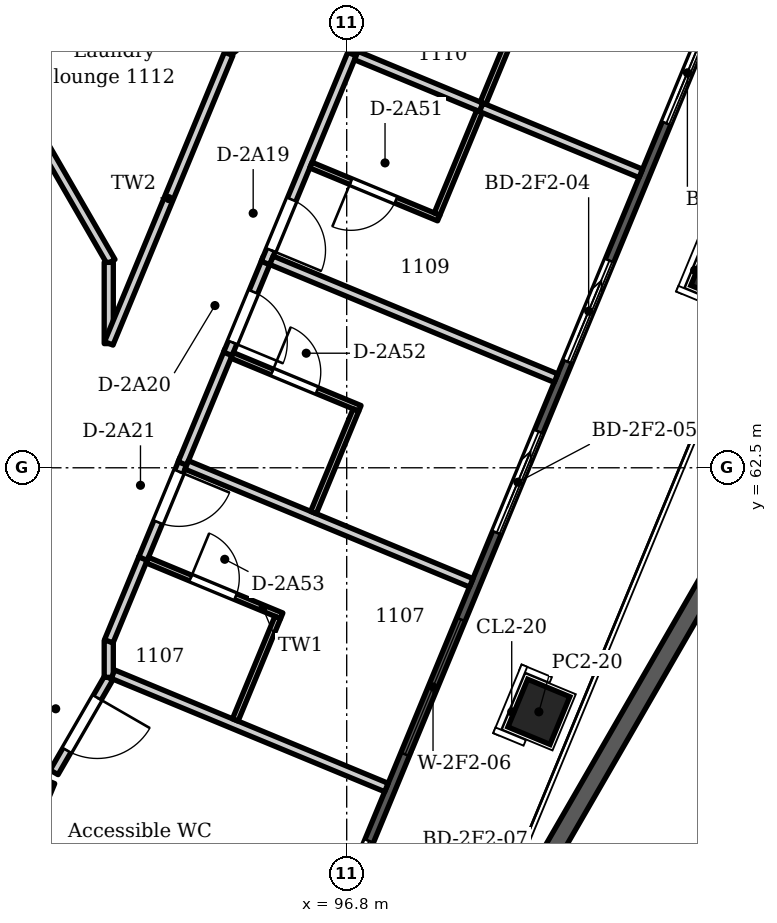
"""IFC4 building model, lengths in metres.
Left out: names, types, materials, properties, quantities, classifications, styles, units other than length and angle.
Written with IfcOpenShell. Run it as: python <this file> out.ifc"""

import sys

from ifc_helpers import new_model, si_unit, direction, frame, frame_2d, origin, origin_2d, place, context, subcontext, project, spatial, polyline, rectangle, outline, extrude, element, fill, save


model = new_model("IFC4")
c1 = context("Model", 3, precision=1e-05, world=origin(), true_north=direction((0.0, 1.0)))
c2 = subcontext(c1, "Body", "Model", "MODEL_VIEW")
j1 = project(units=[si_unit("LENGTHUNIT", "METRE"), si_unit("PLANEANGLEUNIT", "RADIAN")], contexts=[c1])
p1 = place(None, origin())
s1 = spatial("IfcSite", under=j1, at=p1, CompositionType="ELEMENT")
p2 = place(p1, origin())
s2 = spatial("IfcBuilding", under=s1, at=p2, CompositionType="ELEMENT")
p3 = place(p2, frame((0.0, 0.0, 50.4)))
s3 = spatial("IfcBuildingStorey", under=s2, at=p3, CompositionType="ELEMENT", Elevation=50.4)
for number, where, z_axis, x_axis in (
    (1, (102.968, 65.749, -0.35), (0.0, 0.0, 1.0), (0.383, 0.924, 0.0)),
    (2, (99.96, 58.486, -0.35), (0.0, 0.0, 1.0), (0.383, 0.924, 0.0)),
):
    element("IfcColumn", number, at=place(p3, frame(where, z_axis=z_axis, x_axis=x_axis)), inside=s3, PredefinedType="COLUMN", context=c2, shape_type="SweptSolid", body=[
        extrude(rectangle(XDim=0.85, YDim=0.75, at=origin_2d()), origin(), (0.0, 0.0, 1.0), 3.95),
    ])
p4 = place(p3, frame((105.889, 77.411, 0.0), z_axis=(0.0, 0.0, 1.0), x_axis=(-0.38268395344, -0.923879316675, 0.0)))
e3 = element("IfcWall", 3, at=p4, inside=s3, PredefinedType="SOLIDWALL", context=c2, shape_type="SweptSolid", body=[
    extrude(outline(polyline([(0.149, 0.075), (0.149, -0.075), (47.217, -0.075), (47.217, 0.075), (0.149, 0.075)])), origin(), (0.0, 0.0, 1.0), 3.3),
])
p5 = place(p4, frame((1.222, 0.0, 0.0)))
e4 = element("IfcOpeningElement", 4, at=p5, cuts=e3, PredefinedType="OPENING", context=c2, shape_type="SweptSolid", body=[
    extrude(rectangle(XDim=1.8, YDim=2.6, at=frame_2d((0.9, 1.3))), frame((0.0, 0.085, 0.0), z_axis=(0.0, -1.0, 0.0), x_axis=(1.0, 0.0, 0.0)), (0.0, 0.0, 1.0), 0.17),
])
p6 = place(p4, frame((4.565, 0.0, 0.0)))
e5 = element("IfcOpeningElement", 5, at=p6, cuts=e3, PredefinedType="OPENING", context=c2, shape_type="SweptSolid", body=[
    extrude(rectangle(XDim=1.8, YDim=2.6, at=frame_2d((0.9, 1.3))), frame((0.0, 0.085, 0.0), z_axis=(0.0, -1.0, 0.0), x_axis=(1.0, 0.0, 0.0)), (0.0, 0.0, 1.0), 0.17),
])
p7 = place(p4, frame((8.209, 0.0, 0.0)))
e6 = element("IfcOpeningElement", 6, at=p7, cuts=e3, PredefinedType="OPENING", context=c2, shape_type="SweptSolid", body=[
    extrude(rectangle(XDim=1.8, YDim=2.6, at=frame_2d((0.9, 1.3))), frame((0.0, 0.085, 0.0), z_axis=(0.0, -1.0, 0.0), x_axis=(1.0, 0.0, 0.0)), (0.0, 0.0, 1.0), 0.17),
])
p8 = place(p4, frame((12.453, 0.0, 0.0)))
e7 = element("IfcOpeningElement", 7, at=p8, cuts=e3, PredefinedType="OPENING", context=c2, shape_type="SweptSolid", body=[
    extrude(rectangle(XDim=1.8, YDim=2.6, at=frame_2d((0.9, 1.3))), frame((0.0, 0.085, 0.0), z_axis=(0.0, -1.0, 0.0), x_axis=(1.0, 0.0, 0.0)), (0.0, 0.0, 1.0), 0.17),
])
p9 = place(p4, frame((15.496, 0.0, 0.0)))
e8 = element("IfcOpeningElement", 8, at=p9, cuts=e3, PredefinedType="OPENING", context=c2, shape_type="SweptSolid", body=[
    extrude(rectangle(XDim=1.8, YDim=2.6, at=frame_2d((0.9, 1.3))), frame((0.0, 0.085, 0.0), z_axis=(0.0, -1.0, 0.0), x_axis=(1.0, 0.0, 0.0)), (0.0, 0.0, 1.0), 0.17),
])
p10 = place(p4, frame((18.84, 0.0, 0.15)))
e9 = element("IfcOpeningElement", 9, at=p10, cuts=e3, PredefinedType="OPENING", context=c2, shape_type="SweptSolid", body=[
    extrude(rectangle(XDim=2.4, YDim=2.45, at=frame_2d((1.2, 1.225))), frame((0.0, 0.085, 0.0), z_axis=(0.0, -1.0, 0.0), x_axis=(1.0, 0.0, 0.0)), (0.0, 0.0, 1.0), 0.17),
])
p11 = place(p4, frame((22.783, 0.0, 0.0)))
e10 = element("IfcOpeningElement", 10, at=p11, cuts=e3, PredefinedType="OPENING", context=c2, shape_type="SweptSolid", body=[
    extrude(rectangle(XDim=1.8, YDim=2.6, at=frame_2d((0.9, 1.3))), frame((0.0, 0.085, 0.0), z_axis=(0.0, -1.0, 0.0), x_axis=(1.0, 0.0, 0.0)), (0.0, 0.0, 1.0), 0.17),
])
p12 = place(p4, frame((26.127, 0.0, 0.15)))
e11 = element("IfcOpeningElement", 11, at=p12, cuts=e3, PredefinedType="OPENING", context=c2, shape_type="SweptSolid", body=[
    extrude(rectangle(XDim=2.4, YDim=2.45, at=frame_2d((1.2, 1.225))), frame((0.0, 0.085, 0.0), z_axis=(0.0, -1.0, 0.0), x_axis=(1.0, 0.0, 0.0)), (0.0, 0.0, 1.0), 0.17),
])
p13 = place(p4, frame((30.071, 0.0, 0.0)))
e12 = element("IfcOpeningElement", 12, at=p13, cuts=e3, PredefinedType="OPENING", context=c2, shape_type="SweptSolid", body=[
    extrude(rectangle(XDim=1.8, YDim=2.6, at=frame_2d((0.9, 1.3))), frame((0.0, 0.085, 0.0), z_axis=(0.0, -1.0, 0.0), x_axis=(1.0, 0.0, 0.0)), (0.0, 0.0, 1.0), 0.17),
])
p14 = place(p4, frame((33.114, 0.0, 0.0)))
e13 = element("IfcOpeningElement", 13, at=p14, cuts=e3, PredefinedType="OPENING", context=c2, shape_type="SweptSolid", body=[
    extrude(rectangle(XDim=1.8, YDim=2.6, at=frame_2d((0.9, 1.3))), frame((0.0, 0.085, 0.0), z_axis=(0.0, -1.0, 0.0), x_axis=(1.0, 0.0, 0.0)), (0.0, 0.0, 1.0), 0.17),
])
p15 = place(p4, frame((37.358, 0.0, 0.0)))
e14 = element("IfcOpeningElement", 14, at=p15, cuts=e3, PredefinedType="OPENING", context=c2, shape_type="SweptSolid", body=[
    extrude(rectangle(XDim=1.8, YDim=2.6, at=frame_2d((0.9, 1.3))), frame((0.0, 0.085, 0.0), z_axis=(0.0, -1.0, 0.0), x_axis=(1.0, 0.0, 0.0)), (0.0, 0.0, 1.0), 0.17),
])
p16 = place(p4, frame((41.001, 0.0, 0.0)))
e15 = element("IfcOpeningElement", 15, at=p16, cuts=e3, PredefinedType="OPENING", context=c2, shape_type="SweptSolid", body=[
    extrude(rectangle(XDim=1.8, YDim=2.6, at=frame_2d((0.9, 1.3))), frame((0.0, 0.085, 0.0), z_axis=(0.0, -1.0, 0.0), x_axis=(1.0, 0.0, 0.0)), (0.0, 0.0, 1.0), 0.17),
])
p17 = place(p4, frame((44.345, 0.0, 0.0)))
e16 = element("IfcOpeningElement", 16, at=p17, cuts=e3, PredefinedType="OPENING", context=c2, shape_type="SweptSolid", body=[
    extrude(rectangle(XDim=1.8, YDim=2.6, at=frame_2d((0.9, 1.3))), frame((0.0, 0.085, 0.0), z_axis=(0.0, -1.0, 0.0), x_axis=(1.0, 0.0, 0.0)), (0.0, 0.0, 1.0), 0.17),
])
p18 = place(p3, origin())
e17 = element("IfcWall", 17, at=p18, inside=s3, PredefinedType="PARAPET", context=c2, shape_type="SweptSolid", body=[
    extrude(outline(polyline([(97.885, 51.908), (112.536, 77.285), (112.189, 77.285), (98.764, 54.032), (97.885, 51.908)])), origin(), (0.0, 0.0, 1.0), 1.1),
])
p19 = place(p3, frame((87.811, 47.393, 0.0), z_axis=(0.0, 0.0, 1.0), x_axis=(0.382671722525, 0.923884382799, 0.0)))
e18 = element("IfcWall", 18, at=p19, inside=s3, PredefinedType="PARTITIONING", context=c2, shape_type="SweptSolid", body=[
    extrude(rectangle(XDim=10.761, YDim=0.15, at=frame_2d((5.38, 0.0))), origin(), (0.0, 0.0, 1.0), 3.3),
])
p20 = place(p19, frame((8.096, 0.0, 0.0)))
e19 = element("IfcOpeningElement", 19, at=p20, cuts=e18, PredefinedType="OPENING", context=c2, shape_type="SweptSolid", body=[
    extrude(rectangle(XDim=0.9, YDim=2.1, at=frame_2d((0.45, 1.05))), frame((0.0, 0.085, 0.0), z_axis=(0.0, -1.0, 0.0), x_axis=(1.0, 0.0, 0.0)), (0.0, 0.0, 1.0), 0.17),
])
p21 = place(p3, frame((89.471, 71.869, 0.0), z_axis=(0.0, 0.0, 1.0), x_axis=(0.50000193825, -0.866024284732, 0.0)))
e20 = element("IfcWall", 20, at=p21, inside=s3, PredefinedType="PARTITIONING", context=c2, shape_type="SweptSolid", body=[
    extrude(rectangle(XDim=6.906, YDim=0.15, at=frame_2d((3.453, 0.0))), origin(), (0.0, 0.0, 1.0), 2.75),
])
p22 = place(p3, frame((90.542, 75.042, 0.0), z_axis=(0.0, 0.0, 1.0), x_axis=(0.608724186816, -0.793381915842, 0.0)))
e21 = element("IfcWall", 21, at=p22, inside=s3, PredefinedType="PARTITIONING", context=c2, shape_type="SweptSolid", body=[
    extrude(rectangle(XDim=7.215, YDim=0.15, at=frame_2d((3.607, 0.0))), origin(), (0.0, 0.0, 1.0), 2.75),
])
p23 = place(p22, frame((3.12, 0.0, 0.0)))
e22 = element("IfcOpeningElement", 22, at=p23, cuts=e21, PredefinedType="OPENING", context=c2, shape_type="SweptSolid", body=[
    extrude(rectangle(XDim=0.9, YDim=2.1, at=frame_2d((0.45, 1.05))), frame((0.0, 0.085, 0.0), z_axis=(0.0, -1.0, 0.0), x_axis=(1.0, 0.0, 0.0)), (0.0, 0.0, 1.0), 0.17),
])
p24 = place(p3, frame((91.988, 57.491, 0.0), z_axis=(0.0, 0.0, 1.0), x_axis=(0.500200642588, 0.865909531738, 0.0)))
e23 = element("IfcWall", 23, at=p24, inside=s3, PredefinedType="PARTITIONING", context=c2, shape_type="SweptSolid", body=[
    extrude(rectangle(XDim=1.797, YDim=0.15, at=frame_2d((0.898, 0.0))), origin(), (0.0, 0.0, 1.0), 3.3),
])
p25 = place(p24, frame((0.419, 0.0, 0.0)))
e24 = element("IfcOpeningElement", 24, at=p25, cuts=e23, PredefinedType="OPENING", context=c2, shape_type="SweptSolid", body=[
    extrude(rectangle(XDim=1.0, YDim=2.1, at=frame_2d((0.5, 1.05))), frame((0.0, 0.085, 0.0), z_axis=(0.0, -1.0, 0.0), x_axis=(1.0, 0.0, 0.0)), (0.0, 0.0, 1.0), 0.17),
])
p26 = place(p3, frame((92.887, 59.054, 0.0), z_axis=(0.0, 0.0, 1.0), x_axis=(0.0, 1.0, 0.0)))
e25 = element("IfcWall", 25, at=p26, inside=s3, PredefinedType="PARTITIONING", context=c2, shape_type="SweptSolid", body=[
    extrude(rectangle(XDim=0.604, YDim=0.15, at=frame_2d((0.302, 0.0))), origin(), (0.0, 0.0, 1.0), 3.3),
])
p27 = place(p3, frame((92.956, 59.105, 0.0), z_axis=(0.0, 0.0, 1.0), x_axis=(0.923843801062, -0.382769684325, 0.0)))
e26 = element("IfcWall", 26, at=p27, inside=s3, PredefinedType="PARTITIONING", context=c2, shape_type="SweptSolid", body=[
    extrude(rectangle(XDim=4.867, YDim=0.15, at=frame_2d((2.434, 0.0))), origin(), (0.0, 0.0, 1.0), 3.3),
])
p28 = place(p3, frame((92.887, 59.646, 0.0), z_axis=(0.0, 0.0, 1.0), x_axis=(0.382283814647, 0.924044958354, 0.0)))
e27 = element("IfcWall", 27, at=p28, inside=s3, PredefinedType="PARTITIONING", context=c2, shape_type="SweptSolid", body=[
    extrude(rectangle(XDim=1.48, YDim=0.15, at=frame_2d((0.74, 0.0))), origin(), (0.0, 0.0, 1.0), 3.3),
])
p29 = place(p3, frame((92.887, 64.542, 0.0), z_axis=(0.0, 0.0, 1.0), x_axis=(0.0, 1.0, 0.0)))
e28 = element("IfcWall", 28, at=p29, inside=s3, PredefinedType="PARTITIONING", context=c2, shape_type="SweptSolid", body=[
    extrude(rectangle(XDim=1.336, YDim=0.15, at=frame_2d((0.668, 0.0))), origin(), (0.0, 0.0, 1.0), 3.3),
])
p30 = place(p3, frame((92.887, 64.546, 0.0), z_axis=(0.0, 0.0, 1.0), x_axis=(0.382690656651, 0.923876540081, 0.0)))
e29 = element("IfcWall", 29, at=p30, inside=s3, PredefinedType="PARTITIONING", context=c2, shape_type="SweptSolid", body=[
    extrude(rectangle(XDim=5.154, YDim=0.15, at=frame_2d((2.577, 0.0))), origin(), (0.0, 0.0, 1.0), 3.3),
])
p31 = place(p3, frame((93.45, 61.006, 0.0), z_axis=(0.0, 0.0, 1.0), x_axis=(0.382917833313, 0.923782405619, 0.0)))
e30 = element("IfcWall", 30, at=p31, inside=s3, PredefinedType="PARTITIONING", context=c2, shape_type="SweptSolid", body=[
    extrude(rectangle(XDim=1.778, YDim=0.15, at=frame_2d((0.889, 0.0))), origin(), (0.0, 0.0, 1.0), 3.3),
])
p32 = place(p31, frame((0.648, 0.0, 0.0)))
e31 = element("IfcOpeningElement", 31, at=p32, cuts=e30, PredefinedType="OPENING", context=c2, shape_type="SweptSolid", body=[
    extrude(rectangle(XDim=0.9, YDim=2.1, at=frame_2d((0.45, 1.05))), frame((0.0, 0.085, 0.0), z_axis=(0.0, -1.0, 0.0), x_axis=(1.0, 0.0, 0.0)), (0.0, 0.0, 1.0), 0.17),
])
p33 = place(p3, frame((93.521, 60.981, 0.0), z_axis=(0.0, 0.0, 1.0), x_axis=(0.9238961731, -0.38264325596, 0.0)))
e32 = element("IfcWall", 32, at=p33, inside=s3, PredefinedType="PARTITIONING", context=c2, shape_type="SweptSolid", body=[
    extrude(rectangle(XDim=2.392, YDim=0.1, at=frame_2d((1.196, 0.0))), origin(), (0.0, 0.0, 1.0), 3.3),
])
p34 = place(p33, frame((0.771, 0.0, 0.0)))
e33 = element("IfcOpeningElement", 33, at=p34, cuts=e32, PredefinedType="OPENING", context=c2, shape_type="SweptSolid", body=[
    extrude(rectangle(XDim=0.8, YDim=2.1, at=frame_2d((0.4, 1.05))), frame((0.0, 0.06, 0.0), z_axis=(0.0, -1.0, 0.0), x_axis=(1.0, 0.0, 0.0)), (0.0, 0.0, 1.0), 0.12),
])
p35 = place(p3, frame((94.098, 62.571, 0.0), z_axis=(0.0, 0.0, 1.0), x_axis=(0.382863290068, 0.923805012499, 0.0)))
e34 = element("IfcWall", 34, at=p35, inside=s3, PredefinedType="PARTITIONING", context=c2, shape_type="SweptSolid", body=[
    extrude(rectangle(XDim=2.009, YDim=0.15, at=frame_2d((1.005, 0.0))), origin(), (0.0, 0.0, 1.0), 3.3),
])
p36 = place(p3, frame((94.169, 62.546, 0.0), z_axis=(0.0, 0.0, 1.0), x_axis=(0.923879340067, -0.382683896966, 0.0)))
e35 = element("IfcWall", 35, at=p36, inside=s3, PredefinedType="PARTITIONING", context=c2, shape_type="SweptSolid", body=[
    extrude(rectangle(XDim=5.064, YDim=0.15, at=frame_2d((2.532, 0.0))), origin(), (0.0, 0.0, 1.0), 3.3),
])
p37 = place(p3, frame((94.845, 64.373, 0.0), z_axis=(0.0, 0.0, 1.0), x_axis=(0.382668597728, 0.92388567708, 0.0)))
e36 = element("IfcWall", 36, at=p37, inside=s3, PredefinedType="PARTITIONING", context=c2, shape_type="SweptSolid", body=[
    extrude(rectangle(XDim=1.701, YDim=0.15, at=frame_2d((0.851, 0.0))), origin(), (0.0, 0.0, 1.0), 3.3),
])
p38 = place(p37, frame((0.203, 0.0, 0.0)))
e37 = element("IfcOpeningElement", 37, at=p38, cuts=e36, PredefinedType="OPENING", context=c2, shape_type="SweptSolid", body=[
    extrude(rectangle(XDim=0.9, YDim=2.1, at=frame_2d((0.45, 1.05))), frame((0.0, 0.085, 0.0), z_axis=(0.0, -1.0, 0.0), x_axis=(1.0, 0.0, 0.0)), (0.0, 0.0, 1.0), 0.17),
])
p39 = place(p3, frame((94.915, 64.348, 0.0), z_axis=(0.0, 0.0, 1.0), x_axis=(0.923726372156, -0.383052985085, 0.0)))
e38 = element("IfcWall", 38, at=p39, inside=s3, PredefinedType="PARTITIONING", context=c2, shape_type="SweptSolid", body=[
    extrude(rectangle(XDim=2.275, YDim=0.1, at=frame_2d((1.138, 0.0))), origin(), (0.0, 0.0, 1.0), 3.3),
])
p40 = place(p39, frame((0.713, 0.0, 0.0)))
e39 = element("IfcOpeningElement", 39, at=p40, cuts=e38, PredefinedType="OPENING", context=c2, shape_type="SweptSolid", body=[
    extrude(rectangle(XDim=0.8, YDim=2.1, at=frame_2d((0.4, 1.05))), frame((0.0, 0.06, 0.0), z_axis=(0.0, -1.0, 0.0), x_axis=(1.0, 0.0, 0.0)), (0.0, 0.0, 1.0), 0.12),
])
p41 = place(p3, frame((94.968, 58.353, 0.0), z_axis=(0.0, 0.0, 1.0), x_axis=(0.382714221705, 0.923866778548, 0.0)))
e40 = element("IfcWall", 40, at=p41, inside=s3, PredefinedType="PARTITIONING", context=c2, shape_type="SweptSolid", body=[
    extrude(rectangle(XDim=1.824, YDim=0.1, at=frame_2d((0.912, 0.0))), origin(), (0.0, 0.0, 1.0), 3.3),
])
p42 = place(p3, frame((95.464, 65.868, 0.0), z_axis=(0.0, 0.0, 1.0), x_axis=(0.382444409481, 0.923978502811, 0.0)))
e41 = element("IfcWall", 41, at=p42, inside=s3, PredefinedType="PARTITIONING", context=c2, shape_type="SweptSolid", body=[
    extrude(rectangle(XDim=3.803, YDim=0.15, at=frame_2d((1.901, 0.0))), origin(), (0.0, 0.0, 1.0), 3.3),
])
p43 = place(p42, frame((0.229, 0.0, 0.0)))
e42 = element("IfcOpeningElement", 42, at=p43, cuts=e41, PredefinedType="OPENING", context=c2, shape_type="SweptSolid", body=[
    extrude(rectangle(XDim=0.9, YDim=2.1, at=frame_2d((0.45, 1.05))), frame((0.0, 0.085, 0.0), z_axis=(0.0, -1.0, 0.0), x_axis=(1.0, 0.0, 0.0)), (0.0, 0.0, 1.0), 0.17),
])
p44 = place(p3, frame((95.563, 65.912, 0.0), z_axis=(0.0, 0.0, 1.0), x_axis=(0.923879340067, -0.382683896966, 0.0)))
e43 = element("IfcWall", 43, at=p44, inside=s3, PredefinedType="PARTITIONING", context=c2, shape_type="SweptSolid", body=[
    extrude(rectangle(XDim=5.064, YDim=0.15, at=frame_2d((2.532, 0.0))), origin(), (0.0, 0.0, 1.0), 3.3),
])
p45 = place(p3, frame((96.211, 67.477, 0.0), z_axis=(0.0, 0.0, 1.0), x_axis=(0.923931833824, -0.382557141415, 0.0)))
e44 = element("IfcWall", 44, at=p45, inside=s3, PredefinedType="PARTITIONING", context=c2, shape_type="SweptSolid", body=[
    extrude(rectangle(XDim=2.275, YDim=0.1, at=frame_2d((1.138, 0.0))), origin(), (0.0, 0.0, 1.0), 3.3),
])
p46 = place(p45, frame((0.712, 0.0, 0.0)))
e45 = element("IfcOpeningElement", 45, at=p46, cuts=e44, PredefinedType="OPENING", context=c2, shape_type="SweptSolid", body=[
    extrude(rectangle(XDim=0.8, YDim=2.1, at=frame_2d((0.4, 1.05))), frame((0.0, 0.06, 0.0), z_axis=(0.0, -1.0, 0.0), x_axis=(1.0, 0.0, 0.0)), (0.0, 0.0, 1.0), 0.12),
])
p47 = place(p3, frame((96.254, 61.764, 0.0), z_axis=(0.0, 0.0, 1.0), x_axis=(0.382761541363, 0.923847174836, 0.0)))
e46 = element("IfcWall", 46, at=p47, inside=s3, PredefinedType="PARTITIONING", context=c2, shape_type="SweptSolid", body=[
    extrude(rectangle(XDim=1.824, YDim=0.1, at=frame_2d((0.912, 0.0))), origin(), (0.0, 0.0, 1.0), 3.3),
])
p48 = place(p3, frame((96.887, 69.304, 0.0), z_axis=(0.0, 0.0, 1.0), x_axis=(0.382516455335, 0.923948678985, 0.0)))
e47 = element("IfcWall", 47, at=p48, inside=s3, PredefinedType="PARTITIONING", context=c2, shape_type="SweptSolid", body=[
    extrude(rectangle(XDim=2.008, YDim=0.15, at=frame_2d((1.004, 0.0))), origin(), (0.0, 0.0, 1.0), 3.3),
])
p49 = place(p3, frame((96.957, 69.279, 0.0), z_axis=(0.0, 0.0, 1.0), x_axis=(0.923750633898, -0.382994473033, 0.0)))
e48 = element("IfcWall", 48, at=p49, inside=s3, PredefinedType="PARTITIONING", context=c2, shape_type="SweptSolid", body=[
    extrude(rectangle(XDim=2.225, YDim=0.15, at=frame_2d((1.113, 0.0))), origin(), (0.0, 0.0, 1.0), 3.3),
])
p50 = place(p3, frame((98.286, 66.672, 0.0), z_axis=(0.0, 0.0, 1.0), x_axis=(0.382714221705, 0.923866778548, 0.0)))
e49 = element("IfcWall", 49, at=p50, inside=s3, PredefinedType="PARTITIONING", context=c2, shape_type="SweptSolid", body=[
    extrude(rectangle(XDim=1.824, YDim=0.1, at=frame_2d((0.912, 0.0))), origin(), (0.0, 0.0, 1.0), 3.3),
])
p51 = place(p3, frame((99.042, 68.496, 0.0), z_axis=(0.0, 0.0, 1.0), x_axis=(0.382981625731, 0.923755960388, 0.0)))
e50 = element("IfcWall", 50, at=p51, inside=s3, PredefinedType="PARTITIONING", context=c2, shape_type="SweptSolid", body=[
    extrude(rectangle(XDim=1.826, YDim=0.1, at=frame_2d((0.913, 0.0))), origin(), (0.0, 0.0, 1.0), 3.3),
])
p52 = place(p3, frame((99.013, 68.427, 0.0), z_axis=(0.0, 0.0, 1.0), x_axis=(0.923980158274, -0.382440409889, 0.0)))
e51 = element("IfcWall", 51, at=p52, inside=s3, PredefinedType="PARTITIONING", context=c2, shape_type="SweptSolid", body=[
    extrude(rectangle(XDim=2.839, YDim=0.15, at=frame_2d((1.419, 0.0))), origin(), (0.0, 0.0, 1.0), 3.3),
])
p53 = place(p7, origin())
e52 = element("IfcDoor", 52, at=p53, inside=s3, OperationType="SLIDING_TO_LEFT", PredefinedType="DOOR", context=c2, shape_type="SweptSolid", body=[
    extrude(rectangle(XDim=1.8, YDim=2.6, at=frame_2d((0.9, 1.3))), frame((0.0, 0.025, 0.0), z_axis=(0.0, -1.0, 0.0), x_axis=(1.0, 0.0, 0.0)), (0.0, 0.0, 1.0), 0.05),
])
fill(e6, e52)
p54 = place(p8, origin())
e53 = element("IfcDoor", 53, at=p54, inside=s3, OperationType="SLIDING_TO_LEFT", PredefinedType="DOOR", context=c2, shape_type="SweptSolid", body=[
    extrude(rectangle(XDim=1.8, YDim=2.6, at=frame_2d((0.9, 1.3))), frame((0.0, 0.025, 0.0), z_axis=(0.0, -1.0, 0.0), x_axis=(1.0, 0.0, 0.0)), (0.0, 0.0, 1.0), 0.05),
])
fill(e7, e53)
p55 = place(p9, origin())
e54 = element("IfcDoor", 54, at=p55, inside=s3, OperationType="SLIDING_TO_LEFT", PredefinedType="DOOR", context=c2, shape_type="SweptSolid", body=[
    extrude(rectangle(XDim=1.8, YDim=2.6, at=frame_2d((0.9, 1.3))), frame((0.0, 0.025, 0.0), z_axis=(0.0, -1.0, 0.0), x_axis=(1.0, 0.0, 0.0)), (0.0, 0.0, 1.0), 0.05),
])
fill(e8, e54)
p56 = place(p10, origin())
e55 = element("IfcWindow", 55, at=p56, inside=s3, PartitioningType="SINGLE_PANEL", PredefinedType="WINDOW", context=c2, shape_type="SweptSolid", body=[
    extrude(rectangle(XDim=2.4, YDim=2.45, at=frame_2d((1.2, 1.225))), frame((0.0, 0.03, 0.0), z_axis=(0.0, -1.0, 0.0), x_axis=(1.0, 0.0, 0.0)), (0.0, 0.0, 1.0), 0.06),
])
fill(e9, e55)
p57 = place(p11, origin())
e56 = element("IfcDoor", 56, at=p57, inside=s3, OperationType="SLIDING_TO_LEFT", PredefinedType="DOOR", context=c2, shape_type="SweptSolid", body=[
    extrude(rectangle(XDim=1.8, YDim=2.6, at=frame_2d((0.9, 1.3))), frame((0.0, 0.025, 0.0), z_axis=(0.0, -1.0, 0.0), x_axis=(1.0, 0.0, 0.0)), (0.0, 0.0, 1.0), 0.05),
])
fill(e10, e56)
p58 = place(p43, frame((0.9, 0.0, 0.0), z_axis=(0.0, 0.0, 1.0), x_axis=(-1.0, 0.0, 0.0)))
e57 = element("IfcDoor", 57, at=p58, inside=s3, OperationType="SINGLE_SWING_RIGHT", PredefinedType="DOOR", context=c2, shape_type="SweptSolid", body=[
    extrude(rectangle(XDim=0.9, YDim=2.1, at=frame_2d((0.45, 1.05))), frame((0.0, 0.025, 0.0), z_axis=(0.0, -1.0, 0.0), x_axis=(1.0, 0.0, 0.0)), (0.0, 0.0, 1.0), 0.05),
])
fill(e42, e57)
p59 = place(p38, frame((0.9, 0.0, 0.0), z_axis=(0.0, 0.0, 1.0), x_axis=(-1.0, 0.0, 0.0)))
e58 = element("IfcDoor", 58, at=p59, inside=s3, OperationType="SINGLE_SWING_RIGHT", PredefinedType="DOOR", context=c2, shape_type="SweptSolid", body=[
    extrude(rectangle(XDim=0.9, YDim=2.1, at=frame_2d((0.45, 1.05))), frame((0.0, 0.025, 0.0), z_axis=(0.0, -1.0, 0.0), x_axis=(1.0, 0.0, 0.0)), (0.0, 0.0, 1.0), 0.05),
])
fill(e37, e58)
p60 = place(p32, frame((0.9, 0.0, 0.0), z_axis=(0.0, 0.0, 1.0), x_axis=(-1.0, 0.0, 0.0)))
e59 = element("IfcDoor", 59, at=p60, inside=s3, OperationType="SINGLE_SWING_LEFT", PredefinedType="DOOR", context=c2, shape_type="SweptSolid", body=[
    extrude(rectangle(XDim=0.9, YDim=2.1, at=frame_2d((0.45, 1.05))), frame((0.0, 0.025, 0.0), z_axis=(0.0, -1.0, 0.0), x_axis=(1.0, 0.0, 0.0)), (0.0, 0.0, 1.0), 0.05),
])
fill(e31, e59)
p61 = place(p25, frame((1.0, 0.0, 0.0), z_axis=(0.0, 0.0, 1.0), x_axis=(-1.0, 0.0, 0.0)))
e60 = element("IfcDoor", 60, at=p61, inside=s3, OperationType="SINGLE_SWING_LEFT", PredefinedType="DOOR", context=c2, shape_type="SweptSolid", body=[
    extrude(rectangle(XDim=1.0, YDim=2.1, at=frame_2d((0.5, 1.05))), frame((0.0, 0.025, 0.0), z_axis=(0.0, -1.0, 0.0), x_axis=(1.0, 0.0, 0.0)), (0.0, 0.0, 1.0), 0.05),
])
fill(e24, e60)
p62 = place(p46, frame((0.8, 0.0, 0.0), z_axis=(0.0, 0.0, 1.0), x_axis=(-1.0, 0.0, 0.0)))
e61 = element("IfcDoor", 61, at=p62, inside=s3, OperationType="SINGLE_SWING_RIGHT", PredefinedType="DOOR", context=c2, shape_type="SweptSolid", body=[
    extrude(rectangle(XDim=0.8, YDim=2.1, at=frame_2d((0.4, 1.05))), frame((0.0, 0.025, 0.0), z_axis=(0.0, -1.0, 0.0), x_axis=(1.0, 0.0, 0.0)), (0.0, 0.0, 1.0), 0.05),
])
fill(e45, e61)
p63 = place(p40, origin())
e62 = element("IfcDoor", 62, at=p63, inside=s3, OperationType="SINGLE_SWING_LEFT", PredefinedType="DOOR", context=c2, shape_type="SweptSolid", body=[
    extrude(rectangle(XDim=0.8, YDim=2.1, at=frame_2d((0.4, 1.05))), frame((0.0, 0.025, 0.0), z_axis=(0.0, -1.0, 0.0), x_axis=(1.0, 0.0, 0.0)), (0.0, 0.0, 1.0), 0.05),
])
fill(e39, e62)
p64 = place(p34, origin())
e63 = element("IfcDoor", 63, at=p64, inside=s3, OperationType="SINGLE_SWING_LEFT", PredefinedType="DOOR", context=c2, shape_type="SweptSolid", body=[
    extrude(rectangle(XDim=0.8, YDim=2.1, at=frame_2d((0.4, 1.05))), frame((0.0, 0.025, 0.0), z_axis=(0.0, -1.0, 0.0), x_axis=(1.0, 0.0, 0.0)), (0.0, 0.0, 1.0), 0.05),
])
fill(e33, e63)
save(model, sys.argv[1])
